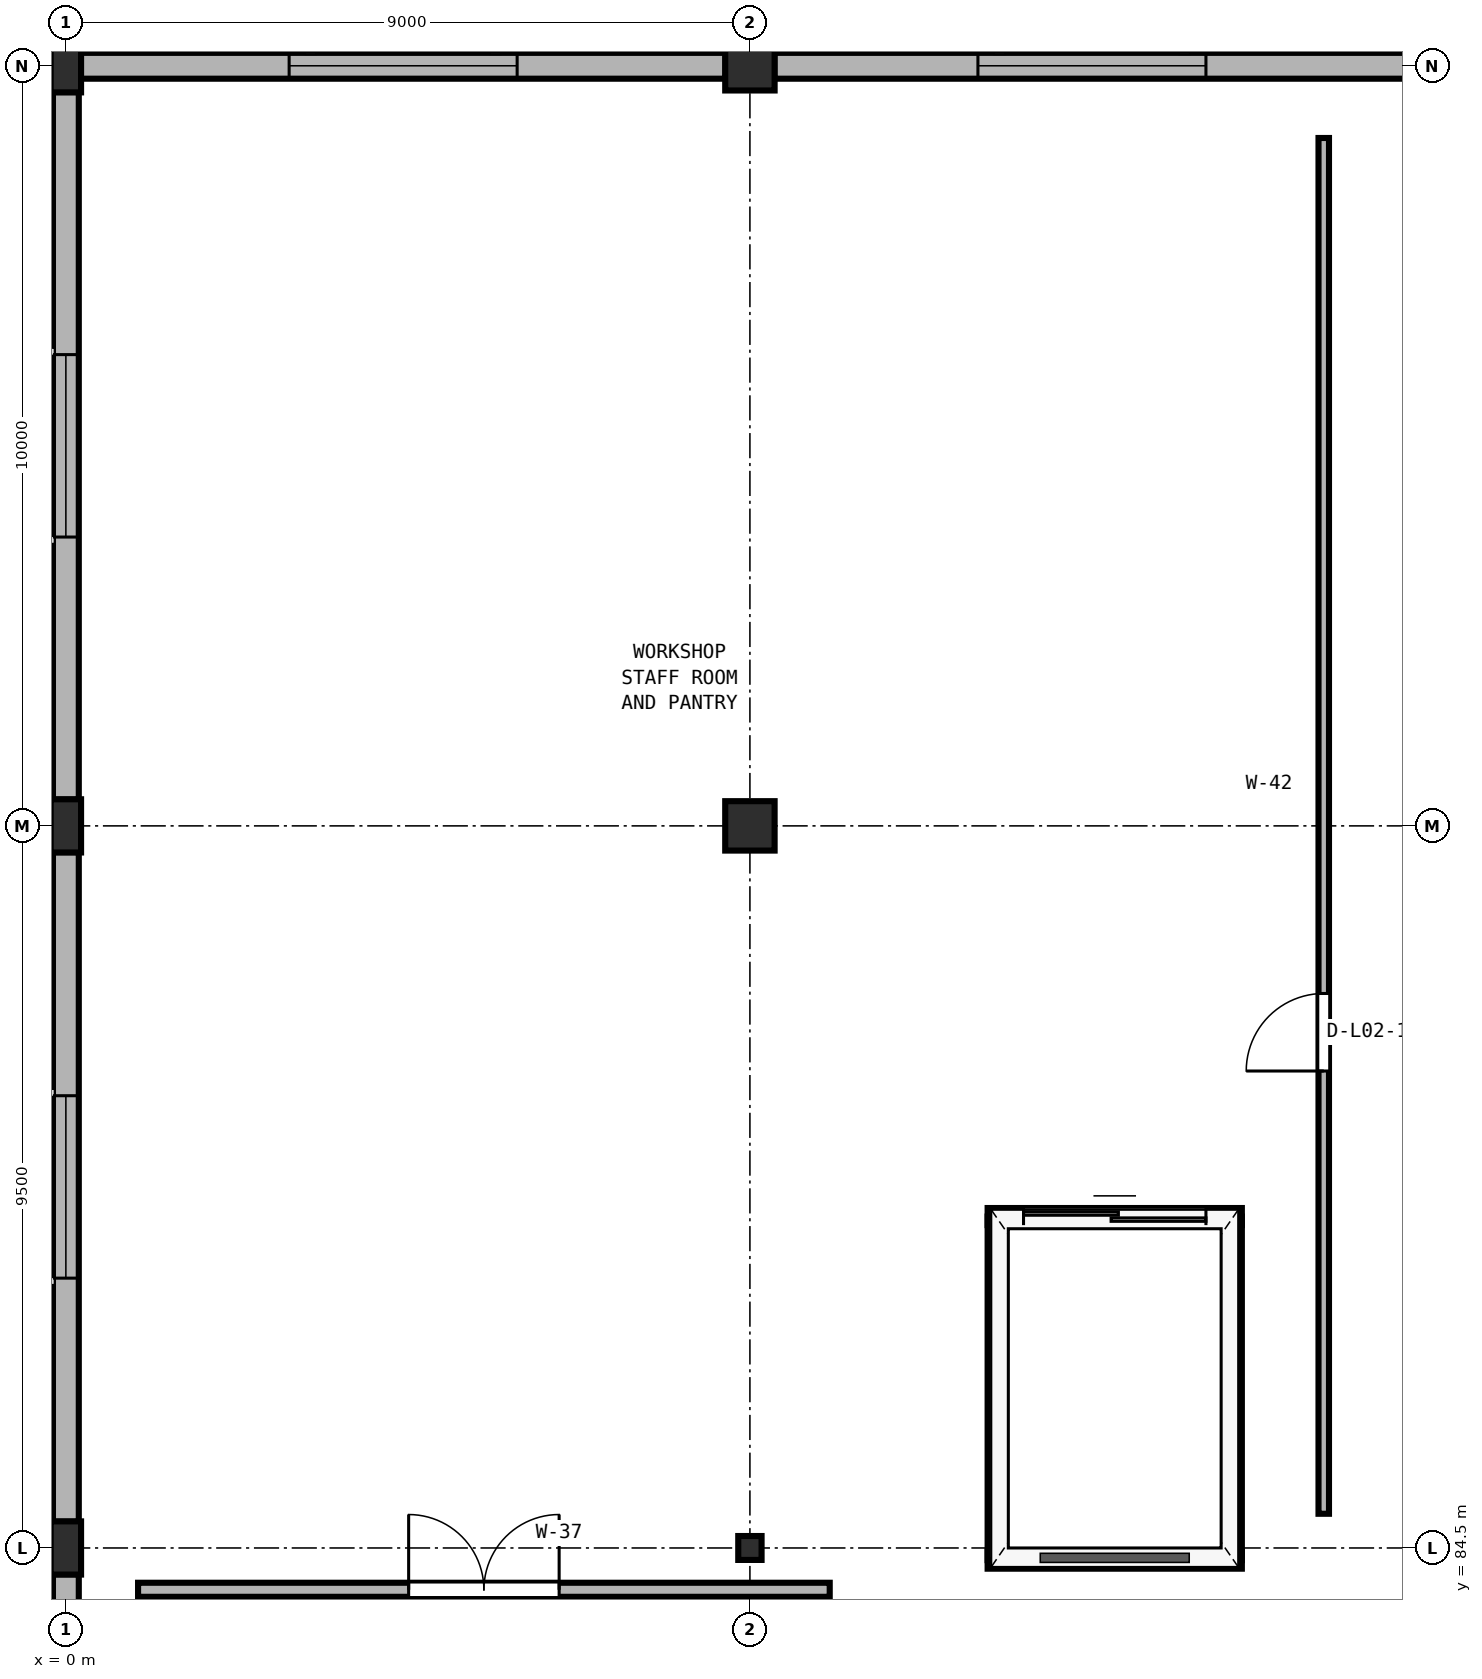
"""IFC4 building model, lengths in metres.
Left out: names, types, materials, properties, quantities, classifications, styles, units other than length and angle.
Written with IfcOpenShell. Run it as: python <this file> out.ifc"""

import sys

from ifc_helpers import new_model, si_unit, direction, frame, frame_2d, origin, origin_2d, place, context, subcontext, project, spatial, rectangle, i_section, extrude, element, fill, save


model = new_model("IFC4")
c1 = context("Model", 3, precision=1e-05, world=origin(), true_north=direction((0.0, 1.0)))
c2 = subcontext(c1, "Body", "Model", "MODEL_VIEW")
j1 = project(units=[si_unit("LENGTHUNIT", "METRE"), si_unit("PLANEANGLEUNIT", "RADIAN")], contexts=[c1])
p1 = place(None, origin())
s1 = spatial("IfcSite", under=j1, at=p1, CompositionType="ELEMENT")
p2 = place(p1, origin())
s2 = spatial("IfcBuilding", under=s1, at=p2, CompositionType="ELEMENT")
p3 = place(p2, frame((0.0, 0.0, 10.2)))
s3 = spatial("IfcBuildingStorey", under=s2, at=p3, CompositionType="ELEMENT", Elevation=10.2)
for number, where, z_axis, x_axis in (
    (1, (0.0, 84.5, 0.0), (0.0, 0.0, 1.0), (1.0, 0.0, 0.0)),
    (2, (0.0, 94.0, 0.0), (0.0, 0.0, 1.0), (1.0, 0.0, 0.0)),
    (3, (0.0, 104.0, 0.0), (0.0, 0.0, 1.0), (1.0, 0.0, 0.0)),
):
    element("IfcColumn", number, at=place(p3, frame(where, z_axis=z_axis, x_axis=x_axis)), inside=s3, PredefinedType="PILASTER", context=c2, shape_type="SweptSolid", body=[
        extrude(rectangle(XDim=0.4, YDim=0.7, at=origin_2d()), origin(), (0.0, 0.0, 1.0), 4.24),
    ])
p4 = place(p3, frame((9.0, 84.5, 0.0), z_axis=(0.0, 0.0, 1.0), x_axis=(1.0, 0.0, 0.0)))
e4 = element("IfcColumn", 4, at=p4, inside=s3, PredefinedType="COLUMN", context=c2, shape_type="SweptSolid", body=[
    extrude(i_section(OverallWidth=0.307, OverallDepth=0.315, WebThickness=0.012, FlangeThickness=0.019, FilletRadius=0.017, at=origin_2d()), origin(), (0.0, 0.0, 1.0), 4.24),
])
for number, where, z_axis, x_axis in (
    (5, (9.0, 94.0, 0.0), (0.0, 0.0, 1.0), (1.0, 0.0, 0.0)),
    (6, (9.0, 104.0, 0.0), (0.0, 0.0, 1.0), (1.0, 0.0, 0.0)),
):
    element("IfcColumn", number, at=place(p3, frame(where, z_axis=z_axis, x_axis=x_axis)), inside=s3, PredefinedType="COLUMN", context=c2, shape_type="SweptSolid", body=[
        extrude(rectangle(XDim=0.65, YDim=0.65, at=origin_2d()), origin(), (0.0, 0.0, 1.0), 4.24),
    ])
p5 = place(p3, frame((0.0, 75.346, 0.0), z_axis=(0.0, 0.0, 1.0), x_axis=(0.0, 1.0, 0.0)))
e7 = element("IfcWall", 7, at=p5, inside=s3, PredefinedType="SOLIDWALL", context=c2, shape_type="SweptSolid", body=[
    extrude(rectangle(XDim=8.808, YDim=0.34, at=frame_2d((4.404, 0.0))), origin(), (0.0, 0.0, 1.0), 3.842),
])
p6 = place(p5, frame((3.204, 0.0, 2.0)))
e8 = element("IfcOpeningElement", 8, at=p6, cuts=e7, PredefinedType="OPENING", context=c2, shape_type="SweptSolid", body=[
    extrude(rectangle(XDim=2.4, YDim=1.25, at=frame_2d((1.2, 0.625))), frame((0.0, 0.18, 0.0), z_axis=(0.0, -1.0, 0.0), x_axis=(1.0, 0.0, 0.0)), (0.0, 0.0, 1.0), 0.36),
])
p7 = place(p3, frame((0.0, 84.846, 0.0), z_axis=(0.0, 0.0, 1.0), x_axis=(0.0, 1.0, 0.0)))
e9 = element("IfcWall", 9, at=p7, inside=s3, PredefinedType="SOLIDWALL", context=c2, shape_type="SweptSolid", body=[
    extrude(rectangle(XDim=8.808, YDim=0.34, at=frame_2d((4.404, 0.0))), origin(), (0.0, 0.0, 1.0), 3.842),
])
p8 = place(p7, frame((3.204, 0.0, 2.0)))
e10 = element("IfcOpeningElement", 10, at=p8, cuts=e9, PredefinedType="OPENING", context=c2, shape_type="SweptSolid", body=[
    extrude(rectangle(XDim=2.4, YDim=1.25, at=frame_2d((1.2, 0.625))), frame((0.0, 0.18, 0.0), z_axis=(0.0, -1.0, 0.0), x_axis=(1.0, 0.0, 0.0)), (0.0, 0.0, 1.0), 0.36),
])
p9 = place(p3, frame((0.0, 94.346, 0.0), z_axis=(0.0, 0.0, 1.0), x_axis=(0.0, 1.0, 0.0)))
e11 = element("IfcWall", 11, at=p9, inside=s3, PredefinedType="SOLIDWALL", context=c2, shape_type="SweptSolid", body=[
    extrude(rectangle(XDim=9.308, YDim=0.34, at=frame_2d((4.654, 0.0))), origin(), (0.0, 0.0, 1.0), 3.842),
])
p10 = place(p9, frame((3.454, 0.0, 2.0)))
e12 = element("IfcOpeningElement", 12, at=p10, cuts=e11, PredefinedType="OPENING", context=c2, shape_type="SweptSolid", body=[
    extrude(rectangle(XDim=2.4, YDim=1.25, at=frame_2d((1.2, 0.625))), frame((0.0, 0.18, 0.0), z_axis=(0.0, -1.0, 0.0), x_axis=(1.0, 0.0, 0.0)), (0.0, 0.0, 1.0), 0.36),
])
p11 = place(p3, frame((0.196, 104.0, 0.0), z_axis=(0.0, 0.0, 1.0), x_axis=(1.0, 0.0, 0.0)))
e13 = element("IfcWall", 13, at=p11, inside=s3, PredefinedType="SOLIDWALL", context=c2, shape_type="SweptSolid", body=[
    extrude(rectangle(XDim=8.483, YDim=0.34, at=frame_2d((4.241, 0.0))), origin(), (0.0, 0.0, 1.0), 3.667),
])
p12 = place(p11, frame((2.741, 0.0, 2.0)))
e14 = element("IfcOpeningElement", 14, at=p12, cuts=e13, PredefinedType="OPENING", context=c2, shape_type="SweptSolid", body=[
    extrude(rectangle(XDim=3.0, YDim=1.4, at=frame_2d((1.5, 0.7))), frame((0.0, 0.18, 0.0), z_axis=(0.0, -1.0, 0.0), x_axis=(1.0, 0.0, 0.0)), (0.0, 0.0, 1.0), 0.36),
])
p13 = place(p3, frame((9.321, 104.0, 0.0), z_axis=(0.0, 0.0, 1.0), x_axis=(1.0, 0.0, 0.0)))
e15 = element("IfcWall", 15, at=p13, inside=s3, PredefinedType="SOLIDWALL", context=c2, shape_type="SweptSolid", body=[
    extrude(rectangle(XDim=8.358, YDim=0.34, at=frame_2d((4.179, 0.0))), origin(), (0.0, 0.0, 1.0), 3.593),
])
p14 = place(p13, frame((2.679, 0.0, 1.943)))
e16 = element("IfcOpeningElement", 16, at=p14, cuts=e15, PredefinedType="OPENING", context=c2, shape_type="SweptSolid", body=[
    extrude(rectangle(XDim=3.0, YDim=1.4, at=frame_2d((1.5, 0.7))), frame((0.0, 0.18, 0.0), z_axis=(0.0, -1.0, 0.0), x_axis=(1.0, 0.0, 0.0)), (0.0, 0.0, 1.0), 0.36),
])
p15 = place(p3, frame((0.0, 104.0, 0.0), z_axis=(0.0, 0.0, 1.0), x_axis=(0.0, 1.0, 0.0)))
e17 = element("IfcWall", 17, at=p15, inside=s3, PredefinedType="PARAPET", context=c2, shape_type="SweptSolid", body=[
    extrude(rectangle(XDim=10.0, YDim=0.23, at=frame_2d((5.0, 0.0))), origin(), (0.0, 0.0, 1.0), 0.85),
])
p16 = place(p3, frame((12.127, 88.86, 0.0), z_axis=(0.0, 0.0, 1.0), x_axis=(1.0, 0.0, 0.0)))
e18 = element("IfcWall", 18, at=p16, inside=s3, PredefinedType="SOLIDWALL", context=c2, shape_type="SweptSolid", body=[
    extrude(rectangle(XDim=3.345, YDim=0.225, at=frame_2d((1.672, 0.0))), origin(), (0.0, 0.0, 1.0), 4.19),
])
p17 = place(p16, frame((0.472, 0.0, 0.0)))
e19 = element("IfcOpeningElement", 19, at=p17, cuts=e18, PredefinedType="OPENING", context=c2, shape_type="SweptSolid", body=[
    extrude(rectangle(XDim=2.4, YDim=2.65, at=frame_2d((1.2, 1.325))), frame((0.0, 0.123, 0.0), z_axis=(0.0, -1.0, 0.0), x_axis=(1.0, 0.0, 0.0)), (0.0, 0.0, 1.0), 0.245),
])
p18 = place(p3, frame((12.127, 84.34, 0.0), z_axis=(0.0, 0.0, 1.0), x_axis=(1.0, 0.0, 0.0)))
e20 = element("IfcWall", 20, at=p18, inside=s3, PredefinedType="SOLIDWALL", context=c2, shape_type="SweptSolid", body=[
    extrude(rectangle(XDim=3.345, YDim=0.225, at=frame_2d((1.672, 0.0))), origin(), (0.0, 0.0, 1.0), 3.797),
])
for number, where, z_axis, x_axis in (
    (21, (12.24, 84.34, 0.0), (0.0, 0.0, 1.0), (0.0, 1.0, 0.0)),
    (22, (15.36, 84.34, 0.0), (0.0, 0.0, 1.0), (0.0, 1.0, 0.0)),
):
    element("IfcWall", number, at=place(p3, frame(where, z_axis=z_axis, x_axis=x_axis)), inside=s3, PredefinedType="SOLIDWALL", context=c2, shape_type="SweptSolid", body=[
        extrude(rectangle(XDim=4.52, YDim=0.225, at=frame_2d((2.26, 0.0))), origin(), (0.0, 0.0, 1.0), 3.797),
    ])
p19 = place(p3, frame((0.95, 83.95, 0.0), z_axis=(0.0, 0.0, 1.0), x_axis=(1.0, 0.0, 0.0)))
e23 = element("IfcWall", 23, at=p19, inside=s3, PredefinedType="PARTITIONING", context=c2, shape_type="SweptSolid", body=[
    extrude(rectangle(XDim=9.1, YDim=0.185, at=frame_2d((4.55, 0.0))), origin(), (0.0, 0.0, 1.0), 4.19),
])
p20 = place(p19, frame((3.56, 0.0, 0.0)))
e24 = element("IfcOpeningElement", 24, at=p20, cuts=e23, PredefinedType="OPENING", context=c2, shape_type="SweptSolid", body=[
    extrude(rectangle(XDim=1.98, YDim=2.42, at=frame_2d((0.99, 1.21))), frame((0.0, 0.103, 0.0), z_axis=(0.0, -1.0, 0.0), x_axis=(1.0, 0.0, 0.0)), (0.0, 0.0, 1.0), 0.205),
])
p21 = place(p3, frame((16.55, 84.95, 0.0), z_axis=(0.0, 0.0, 1.0), x_axis=(0.0, 1.0, 0.0)))
e25 = element("IfcWall", 25, at=p21, inside=s3, PredefinedType="PARTITIONING", context=c2, shape_type="SweptSolid", body=[
    extrude(rectangle(XDim=18.1, YDim=0.138, at=frame_2d((9.05, 0.0))), origin(), (0.0, 0.0, 1.0), 4.19),
])
p22 = place(p21, frame((5.825, 0.0, 0.0)))
e26 = element("IfcOpeningElement", 26, at=p22, cuts=e25, PredefinedType="OPENING", context=c2, shape_type="SweptSolid", body=[
    extrude(rectangle(XDim=1.02, YDim=2.18, at=frame_2d((0.51, 1.09))), frame((0.0, 0.079, 0.0), z_axis=(0.0, -1.0, 0.0), x_axis=(1.0, 0.0, 0.0)), (0.0, 0.0, 1.0), 0.158),
])
p23 = place(p8, origin())
e27 = element("IfcWindow", 27, at=p23, inside=s3, PartitioningType="SINGLE_PANEL", PredefinedType="WINDOW", context=c2, shape_type="SweptSolid", body=[
    extrude(rectangle(XDim=2.4, YDim=1.25, at=frame_2d((1.2, 0.625))), frame((0.0, 0.03, 0.0), z_axis=(0.0, -1.0, 0.0), x_axis=(1.0, 0.0, 0.0)), (0.0, 0.0, 1.0), 0.06),
])
fill(e10, e27)
p24 = place(p10, origin())
e28 = element("IfcWindow", 28, at=p24, inside=s3, PartitioningType="SINGLE_PANEL", PredefinedType="WINDOW", context=c2, shape_type="SweptSolid", body=[
    extrude(rectangle(XDim=2.4, YDim=1.25, at=frame_2d((1.2, 0.625))), frame((0.0, 0.03, 0.0), z_axis=(0.0, -1.0, 0.0), x_axis=(1.0, 0.0, 0.0)), (0.0, 0.0, 1.0), 0.06),
])
fill(e12, e28)
p25 = place(p12, origin())
e29 = element("IfcWindow", 29, at=p25, inside=s3, PartitioningType="SINGLE_PANEL", PredefinedType="WINDOW", context=c2, shape_type="SweptSolid", body=[
    extrude(rectangle(XDim=3.0, YDim=1.4, at=frame_2d((1.5, 0.7))), frame((0.0, 0.03, 0.0), z_axis=(0.0, -1.0, 0.0), x_axis=(1.0, 0.0, 0.0)), (0.0, 0.0, 1.0), 0.06),
])
fill(e14, e29)
p26 = place(p14, origin())
e30 = element("IfcWindow", 30, at=p26, inside=s3, PartitioningType="SINGLE_PANEL", PredefinedType="WINDOW", context=c2, shape_type="SweptSolid", body=[
    extrude(rectangle(XDim=3.0, YDim=1.4, at=frame_2d((1.5, 0.7))), frame((0.0, 0.03, 0.0), z_axis=(0.0, -1.0, 0.0), x_axis=(1.0, 0.0, 0.0)), (0.0, 0.0, 1.0), 0.06),
])
fill(e16, e30)
p27 = place(p17, origin())
e31 = element("IfcDoor", 31, at=p27, inside=s3, OperationType="DOUBLE_DOOR_SLIDING", PredefinedType="DOOR", context=c2, shape_type="SweptSolid", body=[
    extrude(rectangle(XDim=2.4, YDim=2.65, at=frame_2d((1.2, 1.325))), frame((0.0, 0.025, 0.0), z_axis=(0.0, -1.0, 0.0), x_axis=(1.0, 0.0, 0.0)), (0.0, 0.0, 1.0), 0.05),
])
fill(e19, e31)
p28 = place(p20, origin())
e32 = element("IfcDoor", 32, at=p28, inside=s3, OperationType="DOUBLE_DOOR_SINGLE_SWING", PredefinedType="DOOR", context=c2, shape_type="SweptSolid", body=[
    extrude(rectangle(XDim=1.98, YDim=2.42, at=frame_2d((0.99, 1.21))), frame((0.0, 0.025, 0.0), z_axis=(0.0, -1.0, 0.0), x_axis=(1.0, 0.0, 0.0)), (0.0, 0.0, 1.0), 0.05),
])
fill(e24, e32)
p29 = place(p22, origin())
e33 = element("IfcDoor", 33, at=p29, inside=s3, OperationType="SINGLE_SWING_LEFT", PredefinedType="DOOR", context=c2, shape_type="SweptSolid", body=[
    extrude(rectangle(XDim=1.02, YDim=2.18, at=frame_2d((0.51, 1.09))), frame((0.0, 0.025, 0.0), z_axis=(0.0, -1.0, 0.0), x_axis=(1.0, 0.0, 0.0)), (0.0, 0.0, 1.0), 0.05),
])
fill(e26, e33)
save(model, sys.argv[1])
